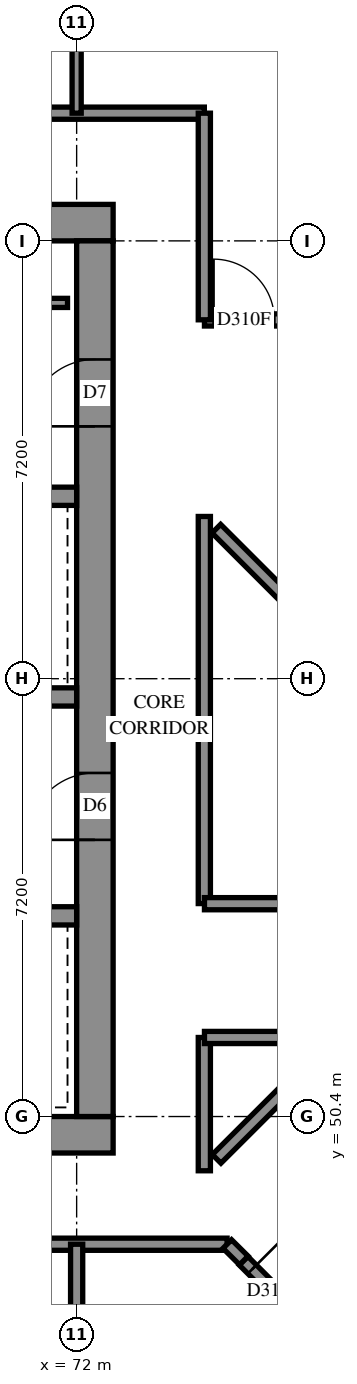
"""IFC4 building model, lengths in metres.
Left out: names, types, materials, properties, quantities, classifications, styles, units other than length and angle.
Written with IfcOpenShell. Run it as: python <this file> out.ifc"""

import sys

from ifc_helpers import new_model, si_unit, direction, frame, frame_2d, origin, place, context, subcontext, project, spatial, rectangle, extrude, element, fill, save


model = new_model("IFC4")
c1 = context("Model", 3, precision=1e-05, world=origin(), true_north=direction((0.0, 1.0)))
c2 = subcontext(c1, "Body", "Model", "MODEL_VIEW")
j1 = project(units=[si_unit("LENGTHUNIT", "METRE"), si_unit("PLANEANGLEUNIT", "RADIAN")], contexts=[c1])
p1 = place(None, origin())
s1 = spatial("IfcSite", under=j1, at=p1, CompositionType="ELEMENT")
p2 = place(p1, origin())
s2 = spatial("IfcBuilding", under=s1, at=p2, CompositionType="ELEMENT")
p3 = place(p2, frame((0.0, 0.0, 152.4)))
s3 = spatial("IfcBuildingStorey", under=s2, at=p3, CompositionType="ELEMENT", Elevation=152.4)
p4 = place(p3, frame((57.0, 50.1, -0.3), z_axis=(0.0, 0.0, 1.0), x_axis=(1.0, 0.0, 0.0)))
e1 = element("IfcWall", 1, at=p4, inside=s3, PredefinedType="SHEAR", context=c2, shape_type="SweptSolid", body=[
    extrude(rectangle(XDim=15.6, YDim=0.6, at=frame_2d((7.8, 0.0))), origin(), (0.0, 0.0, 1.0), 2.7),
])
p5 = place(p3, frame((57.0, 65.1, -0.3), z_axis=(0.0, 0.0, 1.0), x_axis=(1.0, 0.0, 0.0)))
e2 = element("IfcWall", 2, at=p5, inside=s3, PredefinedType="SHEAR", context=c2, shape_type="SweptSolid", body=[
    extrude(rectangle(XDim=15.6, YDim=0.6, at=frame_2d((7.8, 0.0))), origin(), (0.0, 0.0, 1.0), 2.7),
])
p6 = place(p5, frame((10.6, 0.0, 0.3)))
e3 = element("IfcOpeningElement", 3, at=p6, cuts=e2, PredefinedType="OPENING", context=c2, shape_type="SweptSolid", body=[
    extrude(rectangle(XDim=0.8, YDim=2.1, at=frame_2d((0.4, 1.05))), frame((0.0, 0.31, 0.0), z_axis=(0.0, -1.0, 0.0), x_axis=(1.0, 0.0, 0.0)), (0.0, 0.0, 1.0), 0.62),
])
p7 = place(p3, frame((72.3, 50.4, -0.3), z_axis=(0.0, 0.0, 1.0), x_axis=(0.0, 1.0, 0.0)))
e4 = element("IfcWall", 4, at=p7, inside=s3, PredefinedType="SHEAR", context=c2, shape_type="SweptSolid", body=[
    extrude(rectangle(XDim=14.4, YDim=0.6, at=frame_2d((7.2, 0.0))), origin(), (0.0, 0.0, 1.0), 2.7),
])
p8 = place(p7, frame((4.55, 0.0, 0.3)))
e5 = element("IfcOpeningElement", 5, at=p8, cuts=e4, PredefinedType="OPENING", context=c2, shape_type="SweptSolid", body=[
    extrude(rectangle(XDim=1.1, YDim=2.1, at=frame_2d((0.55, 1.05))), frame((0.0, 0.31, 0.0), z_axis=(0.0, -1.0, 0.0), x_axis=(1.0, 0.0, 0.0)), (0.0, 0.0, 1.0), 0.62),
])
p9 = place(p7, frame((11.35, 0.0, 0.3)))
e6 = element("IfcOpeningElement", 6, at=p9, cuts=e4, PredefinedType="OPENING", context=c2, shape_type="SweptSolid", body=[
    extrude(rectangle(XDim=1.1, YDim=2.1, at=frame_2d((0.55, 1.05))), frame((0.0, 0.31, 0.0), z_axis=(0.0, -1.0, 0.0), x_axis=(1.0, 0.0, 0.0)), (0.0, 0.0, 1.0), 0.62),
])
p10 = place(p3, frame((57.6, 53.7, 0.0), z_axis=(0.0, 0.0, 1.0), x_axis=(1.0, 0.0, 0.0)))
e7 = element("IfcWall", 7, at=p10, inside=s3, PredefinedType="SOLIDWALL", context=c2, shape_type="SweptSolid", body=[
    extrude(rectangle(XDim=14.4, YDim=0.3, at=frame_2d((7.2, 0.0))), origin(), (0.0, 0.0, 1.0), 3.1),
])
p11 = place(p10, frame((1.35, 0.0, 0.0)))
e8 = element("IfcOpeningElement", 8, at=p11, cuts=e7, PredefinedType="OPENING", context=c2, shape_type="SweptSolid", body=[
    extrude(rectangle(XDim=0.9, YDim=2.1, at=frame_2d((0.45, 1.05))), frame((0.0, 0.16, 0.0), z_axis=(0.0, -1.0, 0.0), x_axis=(1.0, 0.0, 0.0)), (0.0, 0.0, 1.0), 0.32),
])
p12 = place(p10, frame((4.95, 0.0, 0.0)))
e9 = element("IfcOpeningElement", 9, at=p12, cuts=e7, PredefinedType="OPENING", context=c2, shape_type="SweptSolid", body=[
    extrude(rectangle(XDim=0.9, YDim=2.1, at=frame_2d((0.45, 1.05))), frame((0.0, 0.16, 0.0), z_axis=(0.0, -1.0, 0.0), x_axis=(1.0, 0.0, 0.0)), (0.0, 0.0, 1.0), 0.32),
])
p13 = place(p10, frame((8.55, 0.0, 0.0)))
e10 = element("IfcOpeningElement", 10, at=p13, cuts=e7, PredefinedType="OPENING", context=c2, shape_type="SweptSolid", body=[
    extrude(rectangle(XDim=0.9, YDim=2.1, at=frame_2d((0.45, 1.05))), frame((0.0, 0.16, 0.0), z_axis=(0.0, -1.0, 0.0), x_axis=(1.0, 0.0, 0.0)), (0.0, 0.0, 1.0), 0.32),
])
p14 = place(p10, frame((12.05, 0.0, 0.0)))
e11 = element("IfcOpeningElement", 11, at=p14, cuts=e7, PredefinedType="OPENING", context=c2, shape_type="SweptSolid", body=[
    extrude(rectangle(XDim=1.1, YDim=2.1, at=frame_2d((0.55, 1.05))), frame((0.0, 0.16, 0.0), z_axis=(0.0, -1.0, 0.0), x_axis=(1.0, 0.0, 0.0)), (0.0, 0.0, 1.0), 0.32),
])
p15 = place(p3, frame((57.6, 57.3, 0.0), z_axis=(0.0, 0.0, 1.0), x_axis=(1.0, 0.0, 0.0)))
e12 = element("IfcWall", 12, at=p15, inside=s3, PredefinedType="SOLIDWALL", context=c2, shape_type="SweptSolid", body=[
    extrude(rectangle(XDim=14.4, YDim=0.3, at=frame_2d((7.2, 0.0))), origin(), (0.0, 0.0, 1.0), 3.1),
])
p16 = place(p15, frame((1.25, 0.0, 0.0)))
e13 = element("IfcOpeningElement", 13, at=p16, cuts=e12, PredefinedType="OPENING", context=c2, shape_type="SweptSolid", body=[
    extrude(rectangle(XDim=1.1, YDim=2.1, at=frame_2d((0.55, 1.05))), frame((0.0, 0.16, 0.0), z_axis=(0.0, -1.0, 0.0), x_axis=(1.0, 0.0, 0.0)), (0.0, 0.0, 1.0), 0.32),
])
p17 = place(p15, frame((4.85, 0.0, 0.0)))
e14 = element("IfcOpeningElement", 14, at=p17, cuts=e12, PredefinedType="OPENING", context=c2, shape_type="SweptSolid", body=[
    extrude(rectangle(XDim=1.1, YDim=2.1, at=frame_2d((0.55, 1.05))), frame((0.0, 0.16, 0.0), z_axis=(0.0, -1.0, 0.0), x_axis=(1.0, 0.0, 0.0)), (0.0, 0.0, 1.0), 0.32),
])
p18 = place(p15, frame((8.45, 0.0, 0.0)))
e15 = element("IfcOpeningElement", 15, at=p18, cuts=e12, PredefinedType="OPENING", context=c2, shape_type="SweptSolid", body=[
    extrude(rectangle(XDim=1.1, YDim=2.1, at=frame_2d((0.55, 1.05))), frame((0.0, 0.16, 0.0), z_axis=(0.0, -1.0, 0.0), x_axis=(1.0, 0.0, 0.0)), (0.0, 0.0, 1.0), 0.32),
])
p19 = place(p15, frame((12.05, 0.0, 0.0)))
e16 = element("IfcOpeningElement", 16, at=p19, cuts=e12, PredefinedType="OPENING", context=c2, shape_type="SweptSolid", body=[
    extrude(rectangle(XDim=1.1, YDim=2.1, at=frame_2d((0.55, 1.05))), frame((0.0, 0.16, 0.0), z_axis=(0.0, -1.0, 0.0), x_axis=(1.0, 0.0, 0.0)), (0.0, 0.0, 1.0), 0.32),
])
p20 = place(p3, frame((64.8, 60.6, 0.0), z_axis=(0.0, 0.0, 1.0), x_axis=(1.0, 0.0, 0.0)))
e17 = element("IfcWall", 17, at=p20, inside=s3, PredefinedType="SOLIDWALL", context=c2, shape_type="SweptSolid", body=[
    extrude(rectangle(XDim=7.2, YDim=0.3, at=frame_2d((3.6, 0.0))), origin(), (0.0, 0.0, 1.0), 3.1),
])
p21 = place(p3, frame((64.95, 63.78, 0.0), z_axis=(0.0, 0.0, 1.0), x_axis=(1.0, 0.0, 0.0)))
e18 = element("IfcWall", 18, at=p21, inside=s3, PredefinedType="PARTITIONING", context=c2, shape_type="SweptSolid", body=[
    extrude(rectangle(XDim=6.9, YDim=0.15, at=frame_2d((3.45, 0.0))), origin(), (0.0, 0.0, 1.0), 3.1),
])
p22 = place(p3, frame((55.5, 48.3, 0.0), z_axis=(0.0, 0.0, 1.0), x_axis=(1.0, 0.0, 0.0)))
e19 = element("IfcWall", 19, at=p22, inside=s3, PredefinedType="PARTITIONING", context=c2, shape_type="SweptSolid", body=[
    extrude(rectangle(XDim=18.974, YDim=0.2, at=frame_2d((9.487, 0.0))), origin(), (0.0, 0.0, 1.0), 3.1),
])
p23 = place(p22, frame((4.4, 0.0, 0.0)))
e20 = element("IfcOpeningElement", 20, at=p23, cuts=e19, PredefinedType="OPENING", context=c2, shape_type="SweptSolid", body=[
    extrude(rectangle(XDim=0.9, YDim=2.1, at=frame_2d((0.45, 1.05))), frame((0.0, 0.11, 0.0), z_axis=(0.0, -1.0, 0.0), x_axis=(1.0, 0.0, 0.0)), (0.0, 0.0, 1.0), 0.22),
])
p24 = place(p22, frame((6.1, 0.0, 0.0)))
e21 = element("IfcOpeningElement", 21, at=p24, cuts=e19, PredefinedType="OPENING", context=c2, shape_type="SweptSolid", body=[
    extrude(rectangle(XDim=0.9, YDim=2.1, at=frame_2d((0.45, 1.05))), frame((0.0, 0.11, 0.0), z_axis=(0.0, -1.0, 0.0), x_axis=(1.0, 0.0, 0.0)), (0.0, 0.0, 1.0), 0.22),
])
p25 = place(p22, frame((13.162, 0.0, 0.0)))
e22 = element("IfcOpeningElement", 22, at=p25, cuts=e19, PredefinedType="OPENING", context=c2, shape_type="SweptSolid", body=[
    extrude(rectangle(XDim=1.0, YDim=2.1, at=frame_2d((0.5, 1.05))), frame((0.0, 0.11, 0.0), z_axis=(0.0, -1.0, 0.0), x_axis=(1.0, 0.0, 0.0)), (0.0, 0.0, 1.0), 0.22),
])
p26 = place(p3, frame((55.5, 66.9, 0.0), z_axis=(0.0, 0.0, 1.0), x_axis=(1.0, 0.0, 0.0)))
e23 = element("IfcWall", 23, at=p26, inside=s3, PredefinedType="PARTITIONING", context=c2, shape_type="SweptSolid", body=[
    extrude(rectangle(XDim=18.6, YDim=0.2, at=frame_2d((9.3, 0.0))), origin(), (0.0, 0.0, 1.0), 3.1),
])
p27 = place(p26, frame((4.4, 0.0, 0.0)))
e24 = element("IfcOpeningElement", 24, at=p27, cuts=e23, PredefinedType="OPENING", context=c2, shape_type="SweptSolid", body=[
    extrude(rectangle(XDim=0.9, YDim=2.1, at=frame_2d((0.45, 1.05))), frame((0.0, 0.11, 0.0), z_axis=(0.0, -1.0, 0.0), x_axis=(1.0, 0.0, 0.0)), (0.0, 0.0, 1.0), 0.22),
])
p28 = place(p26, frame((6.1, 0.0, 0.0)))
e25 = element("IfcOpeningElement", 25, at=p28, cuts=e23, PredefinedType="OPENING", context=c2, shape_type="SweptSolid", body=[
    extrude(rectangle(XDim=0.9, YDim=2.1, at=frame_2d((0.45, 1.05))), frame((0.0, 0.11, 0.0), z_axis=(0.0, -1.0, 0.0), x_axis=(1.0, 0.0, 0.0)), (0.0, 0.0, 1.0), 0.22),
])
p29 = place(p26, frame((11.65, 0.0, 0.0)))
e26 = element("IfcOpeningElement", 26, at=p29, cuts=e23, PredefinedType="OPENING", context=c2, shape_type="SweptSolid", body=[
    extrude(rectangle(XDim=0.9, YDim=2.1, at=frame_2d((0.45, 1.05))), frame((0.0, 0.11, 0.0), z_axis=(0.0, -1.0, 0.0), x_axis=(1.0, 0.0, 0.0)), (0.0, 0.0, 1.0), 0.22),
])
p30 = place(p26, frame((13.3, 0.0, 0.0)))
e27 = element("IfcOpeningElement", 27, at=p30, cuts=e23, PredefinedType="OPENING", context=c2, shape_type="SweptSolid", body=[
    extrude(rectangle(XDim=0.9, YDim=2.1, at=frame_2d((0.45, 1.05))), frame((0.0, 0.11, 0.0), z_axis=(0.0, -1.0, 0.0), x_axis=(1.0, 0.0, 0.0)), (0.0, 0.0, 1.0), 0.22),
])
p31 = place(p3, frame((74.1, 53.902, 0.0), z_axis=(0.0, 0.0, 1.0), x_axis=(0.0, 1.0, 0.0)))
e28 = element("IfcWall", 28, at=p31, inside=s3, PredefinedType="PARTITIONING", context=c2, shape_type="SweptSolid", body=[
    extrude(rectangle(XDim=6.366, YDim=0.2, at=frame_2d((3.183, 0.0))), origin(), (0.0, 0.0, 1.0), 3.1),
])
p32 = place(p3, frame((74.102, 63.5, 0.0), z_axis=(0.0, 0.0, 1.0), x_axis=(1.0, 0.0, 0.0)))
e29 = element("IfcWall", 29, at=p32, inside=s3, PredefinedType="PARTITIONING", context=c2, shape_type="SweptSolid", body=[
    extrude(rectangle(XDim=5.098, YDim=0.2, at=frame_2d((2.549, 0.0))), origin(), (0.0, 0.0, 1.0), 3.1),
])
p33 = place(p32, frame((0.149, 0.0, 0.0)))
e30 = element("IfcOpeningElement", 30, at=p33, cuts=e29, PredefinedType="OPENING", context=c2, shape_type="SweptSolid", body=[
    extrude(rectangle(XDim=1.0, YDim=2.1, at=frame_2d((0.5, 1.05))), frame((0.0, 0.11, 0.0), z_axis=(0.0, -1.0, 0.0), x_axis=(1.0, 0.0, 0.0)), (0.0, 0.0, 1.0), 0.22),
])
p34 = place(p32, frame((3.688, 0.0, 0.0)))
e31 = element("IfcOpeningElement", 31, at=p34, cuts=e29, PredefinedType="OPENING", context=c2, shape_type="SweptSolid", body=[
    extrude(rectangle(XDim=0.9, YDim=2.1, at=frame_2d((0.45, 1.05))), frame((0.0, 0.11, 0.0), z_axis=(0.0, -1.0, 0.0), x_axis=(1.0, 0.0, 0.0)), (0.0, 0.0, 1.0), 0.22),
])
p35 = place(p3, frame((72.0, 43.65, 0.0), z_axis=(0.0, 0.0, 1.0), x_axis=(0.0, 1.0, 0.0)))
e32 = element("IfcWall", 32, at=p35, inside=s3, PredefinedType="PARTITIONING", context=c2, shape_type="SweptSolid", body=[
    extrude(rectangle(XDim=4.65, YDim=0.2, at=frame_2d((2.325, 0.0))), origin(), (0.0, 0.0, 1.0), 3.1),
])
p36 = place(p3, frame((74.745, 48.029, 0.0), z_axis=(0.0, 0.0, 1.0), x_axis=(0.7068806156, -0.7073328745, 0.0)))
e33 = element("IfcWall", 33, at=p36, inside=s3, PredefinedType="PARTITIONING", context=c2, shape_type="SweptSolid", body=[
    extrude(rectangle(XDim=4.422, YDim=0.2, at=frame_2d((2.211, 0.0))), origin(), (0.0, 0.0, 1.0), 3.1),
])
p37 = place(p36, frame((0.199, 0.0, 0.0)))
e34 = element("IfcOpeningElement", 34, at=p37, cuts=e33, PredefinedType="OPENING", context=c2, shape_type="SweptSolid", body=[
    extrude(rectangle(XDim=1.0, YDim=2.1, at=frame_2d((0.5, 1.05))), frame((0.0, 0.11, 0.0), z_axis=(0.0, -1.0, 0.0), x_axis=(1.0, 0.0, 0.0)), (0.0, 0.0, 1.0), 0.22),
])
p38 = place(p3, frame((74.102, 53.9, 0.0), z_axis=(0.0, 0.0, 1.0), x_axis=(1.0, 0.0, 0.0)))
e35 = element("IfcWall", 35, at=p38, inside=s3, PredefinedType="PARTITIONING", context=c2, shape_type="SweptSolid", body=[
    extrude(rectangle(XDim=4.392, YDim=0.2, at=frame_2d((2.196, 0.0))), origin(), (0.0, 0.0, 1.0), 3.1),
])
p39 = place(p38, frame((1.415, 0.0, 0.0)))
e36 = element("IfcOpeningElement", 36, at=p39, cuts=e35, PredefinedType="OPENING", context=c2, shape_type="SweptSolid", body=[
    extrude(rectangle(XDim=1.0, YDim=2.1, at=frame_2d((0.5, 1.05))), frame((0.0, 0.11, 0.0), z_axis=(0.0, -1.0, 0.0), x_axis=(1.0, 0.0, 0.0)), (0.0, 0.0, 1.0), 0.22),
])
p40 = place(p3, frame((74.1, 63.502, 0.0), z_axis=(0.0, 0.0, 1.0), x_axis=(0.0, 1.0, 0.0)))
e37 = element("IfcWall", 37, at=p40, inside=s3, PredefinedType="PARTITIONING", context=c2, shape_type="SweptSolid", body=[
    extrude(rectangle(XDim=3.398, YDim=0.2, at=frame_2d((1.699, 0.0))), origin(), (0.0, 0.0, 1.0), 3.1),
])
p41 = place(p3, frame((74.302, 49.704, 0.0), z_axis=(0.0, 0.0, 1.0), x_axis=(0.7074614873, 0.706751897, 0.0)))
e38 = element("IfcWall", 38, at=p41, inside=s3, PredefinedType="PARTITIONING", context=c2, shape_type="SweptSolid", body=[
    extrude(rectangle(XDim=2.818, YDim=0.2, at=frame_2d((1.409, 0.0))), origin(), (0.0, 0.0, 1.0), 3.1),
])
p42 = place(p3, frame((72.0, 66.9, 0.0), z_axis=(0.0, 0.0, 1.0), x_axis=(0.0, 1.0, 0.0)))
e39 = element("IfcWall", 39, at=p42, inside=s3, PredefinedType="PARTITIONING", context=c2, shape_type="SweptSolid", body=[
    extrude(rectangle(XDim=2.4, YDim=0.15, at=frame_2d((1.2, 0.0))), origin(), (0.0, 0.0, 1.0), 3.1),
])
p43 = place(p3, frame((74.297, 60.067, 0.0), z_axis=(0.0, 0.0, 1.0), x_axis=(0.7071067812, -0.7071067812, 0.0)))
e40 = element("IfcWall", 40, at=p43, inside=s3, PredefinedType="PARTITIONING", context=c2, shape_type="SweptSolid", body=[
    extrude(rectangle(XDim=2.229, YDim=0.2, at=frame_2d((1.114, 0.0))), origin(), (0.0, 0.0, 1.0), 3.1),
])
p44 = place(p3, frame((74.1, 49.508, 0.0), z_axis=(0.0, 0.0, 1.0), x_axis=(0.0, 1.0, 0.0)))
e41 = element("IfcWall", 41, at=p44, inside=s3, PredefinedType="PARTITIONING", context=c2, shape_type="SweptSolid", body=[
    extrude(rectangle(XDim=2.192, YDim=0.2, at=frame_2d((1.096, 0.0))), origin(), (0.0, 0.0, 1.0), 3.1),
])
p45 = place(p3, frame((74.102, 51.7, 0.0), z_axis=(0.0, 0.0, 1.0), x_axis=(1.0, 0.0, 0.0)))
e42 = element("IfcWall", 42, at=p45, inside=s3, PredefinedType="PARTITIONING", context=c2, shape_type="SweptSolid", body=[
    extrude(rectangle(XDim=2.19, YDim=0.2, at=frame_2d((1.095, 0.0))), origin(), (0.0, 0.0, 1.0), 3.1),
])
p46 = place(p3, frame((74.477, 48.303, 0.0), z_axis=(0.0, 0.0, 1.0), x_axis=(0.7097111995, -0.7044927348, 0.0)))
e43 = element("IfcWall", 43, at=p46, inside=s3, PredefinedType="PARTITIONING", context=c2, shape_type="SweptSolid", body=[
    extrude(rectangle(XDim=0.383, YDim=0.2, at=frame_2d((0.192, 0.0))), origin(), (0.0, 0.0, 1.0), 3.1),
])
p47 = place(p8, origin())
e44 = element("IfcDoor", 44, at=p47, inside=s3, OperationType="DOUBLE_DOOR_SINGLE_SWING", PredefinedType="DOOR", context=c2, shape_type="SweptSolid", body=[
    extrude(rectangle(XDim=1.1, YDim=2.1, at=frame_2d((0.55, 1.05))), frame((0.0, 0.025, 0.0), z_axis=(0.0, -1.0, 0.0), x_axis=(1.0, 0.0, 0.0)), (0.0, 0.0, 1.0), 0.05),
])
fill(e5, e44)
p48 = place(p9, origin())
e45 = element("IfcDoor", 45, at=p48, inside=s3, OperationType="SINGLE_SWING_RIGHT", PredefinedType="DOOR", context=c2, shape_type="SweptSolid", body=[
    extrude(rectangle(XDim=1.1, YDim=2.1, at=frame_2d((0.55, 1.05))), frame((0.0, 0.025, 0.0), z_axis=(0.0, -1.0, 0.0), x_axis=(1.0, 0.0, 0.0)), (0.0, 0.0, 1.0), 0.05),
])
fill(e6, e45)
p49 = place(p33, origin())
e46 = element("IfcDoor", 46, at=p49, inside=s3, OperationType="SINGLE_SWING_RIGHT", PredefinedType="DOOR", context=c2, shape_type="SweptSolid", body=[
    extrude(rectangle(XDim=1.0, YDim=2.1, at=frame_2d((0.5, 1.05))), frame((0.0, 0.025, 0.0), z_axis=(0.0, -1.0, 0.0), x_axis=(1.0, 0.0, 0.0)), (0.0, 0.0, 1.0), 0.05),
])
fill(e30, e46)
p50 = place(p37, origin())
e47 = element("IfcDoor", 47, at=p50, inside=s3, OperationType="SINGLE_SWING_LEFT", PredefinedType="DOOR", context=c2, shape_type="SweptSolid", body=[
    extrude(rectangle(XDim=1.0, YDim=2.1, at=frame_2d((0.5, 1.05))), frame((0.0, 0.025, 0.0), z_axis=(0.0, -1.0, 0.0), x_axis=(1.0, 0.0, 0.0)), (0.0, 0.0, 1.0), 0.05),
])
fill(e34, e47)
save(model, sys.argv[1])
